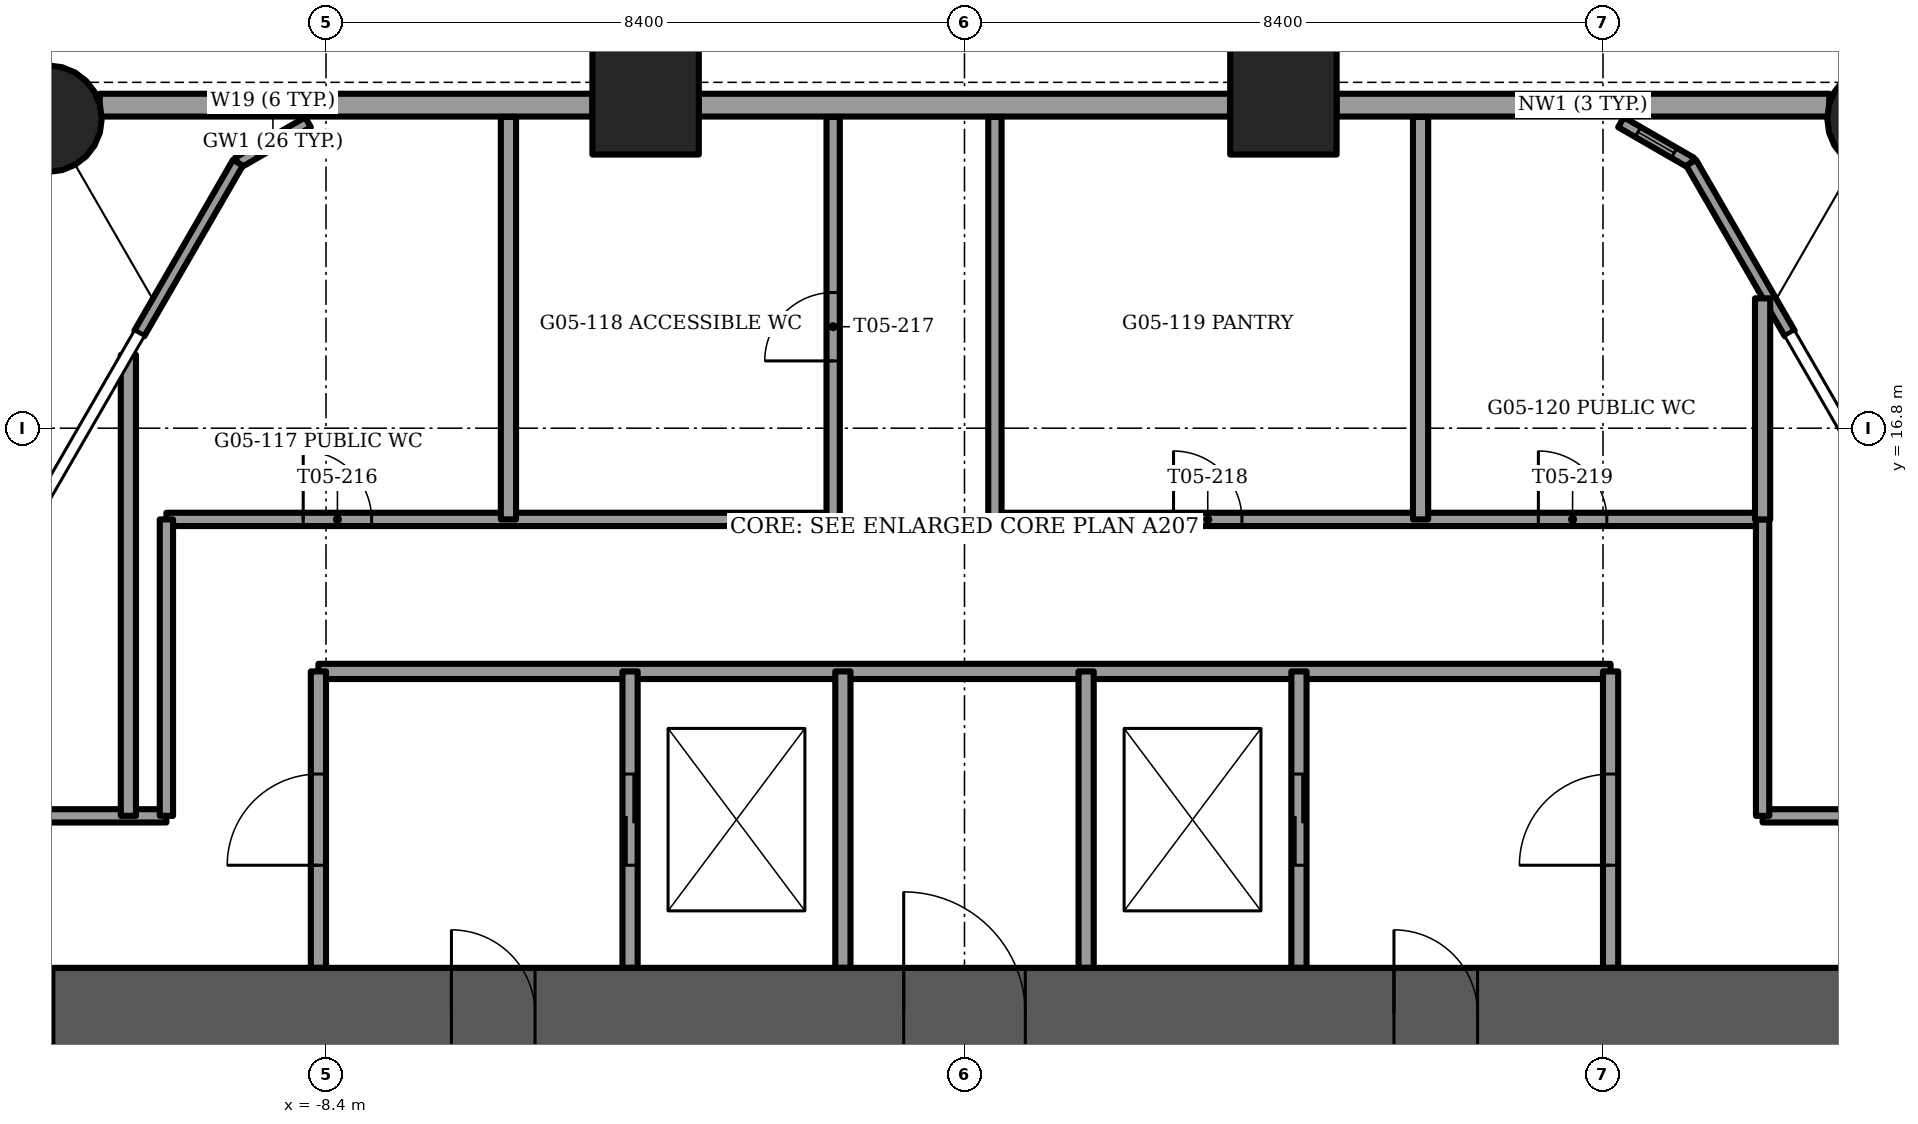
"""IFC4 building model, lengths in metres.
Left out: names, types, materials, properties, quantities, classifications, styles, units other than length and angle.
Written with IfcOpenShell. Run it as: python <this file> out.ifc"""

import sys

from ifc_helpers import new_model, si_unit, direction, frame, frame_2d, origin, origin_2d, place, context, subcontext, project, spatial, rectangle, circle, extrude, element, fill, save


model = new_model("IFC4")
c1 = context("Model", 3, precision=1e-05, world=origin(), true_north=direction((0.0, 1.0)))
c2 = subcontext(c1, "Body", "Model", "MODEL_VIEW")
j1 = project(units=[si_unit("LENGTHUNIT", "METRE"), si_unit("PLANEANGLEUNIT", "RADIAN")], contexts=[c1])
p1 = place(None, origin())
s1 = spatial("IfcSite", under=j1, at=p1, CompositionType="ELEMENT")
p2 = place(p1, origin())
s2 = spatial("IfcBuilding", under=s1, at=p2, CompositionType="ELEMENT")
p3 = place(p2, frame((0.0, 0.0, 23.5)))
s3 = spatial("IfcBuildingStorey", under=s2, at=p3, CompositionType="ELEMENT", Elevation=23.5)
for number, where, z_axis, x_axis in (
    (1, (-12.051, 20.872, -1.2), (0.0, 0.0, 1.0), (1.0, 0.0, 0.0)),
    (2, (12.051, 20.872, -1.2), (0.0, 0.0, 1.0), (1.0, 0.0, 0.0)),
):
    element("IfcColumn", number, at=place(p3, frame(where, z_axis=z_axis, x_axis=x_axis)), inside=s3, PredefinedType="COLUMN", context=c2, shape_type="SweptSolid", body=[
        extrude(circle(Radius=0.7, at=origin_2d()), origin(), (0.0, 0.0, 1.0), 4.5),
    ])
for number, where, z_axis, x_axis in (
    (3, (4.195, 21.1, -1.2), (0.0, 0.0, 1.0), (1.0, 0.0, 0.0)),
    (4, (-4.195, 21.1, -1.2), (0.0, 0.0, 1.0), (1.0, 0.0, 0.0)),
):
    element("IfcColumn", number, at=place(p3, frame(where, z_axis=z_axis, x_axis=x_axis)), inside=s3, PredefinedType="COLUMN", context=c2, shape_type="SweptSolid", body=[
        extrude(rectangle(XDim=1.4, YDim=1.4, at=origin_2d()), origin(), (0.0, 0.0, 1.0), 4.5),
    ])
p4 = place(p3, frame((-12.0, 9.1, -0.3), z_axis=(0.0, 0.0, 1.0), x_axis=(1.0, 0.0, 0.0)))
e5 = element("IfcWall", 5, at=p4, inside=s3, PredefinedType="SHEAR", context=c2, shape_type="SweptSolid", body=[
    extrude(rectangle(XDim=24.0, YDim=1.2, at=frame_2d((12.0, 0.0))), origin(), (0.0, 0.0, 1.0), 4.5),
])
p5 = place(p4, frame((11.2, 0.0, 0.0)))
e6 = element("IfcOpeningElement", 6, at=p5, cuts=e5, PredefinedType="OPENING", context=c2, shape_type="SweptSolid", body=[
    extrude(rectangle(XDim=1.6, YDim=2.1, at=frame_2d((0.8, 1.05))), frame((0.0, 0.6, 0.0), z_axis=(0.0, -1.0, 0.0), x_axis=(1.0, 0.0, 0.0)), (0.0, 0.0, 1.0), 1.2),
])
p6 = place(p4, frame((5.25, 0.0, 0.0)))
e7 = element("IfcOpeningElement", 7, at=p6, cuts=e5, PredefinedType="OPENING", context=c2, shape_type="SweptSolid", body=[
    extrude(rectangle(XDim=1.1, YDim=2.1, at=frame_2d((0.55, 1.05))), frame((0.0, 0.6, 0.0), z_axis=(0.0, -1.0, 0.0), x_axis=(1.0, 0.0, 0.0)), (0.0, 0.0, 1.0), 1.2),
])
p7 = place(p4, frame((17.65, 0.0, 0.0)))
e8 = element("IfcOpeningElement", 8, at=p7, cuts=e5, PredefinedType="OPENING", context=c2, shape_type="SweptSolid", body=[
    extrude(rectangle(XDim=1.1, YDim=2.1, at=frame_2d((0.55, 1.05))), frame((0.0, 0.6, 0.0), z_axis=(0.0, -1.0, 0.0), x_axis=(1.0, 0.0, 0.0)), (0.0, 0.0, 1.0), 1.2),
])
p8 = place(p3, frame((11.377, 21.05, 0.0), z_axis=(0.0, 0.0, 1.0), x_axis=(-1.0, 0.0, 0.0)))
e9 = element("IfcWall", 9, at=p8, inside=s3, PredefinedType="SOLIDWALL", context=c2, shape_type="SweptSolid", body=[
    extrude(rectangle(XDim=6.481, YDim=0.3, at=frame_2d((3.241, 0.0))), origin(), (0.0, 0.0, 1.0), 3.3),
])
p9 = place(p3, frame((3.495, 21.05, 0.0), z_axis=(0.0, 0.0, 1.0), x_axis=(-1.0, 0.0, 0.0)))
e10 = element("IfcWall", 10, at=p9, inside=s3, PredefinedType="SOLIDWALL", context=c2, shape_type="SweptSolid", body=[
    extrude(rectangle(XDim=6.991, YDim=0.3, at=frame_2d((3.495, 0.0))), origin(), (0.0, 0.0, 1.0), 3.3),
])
p10 = place(p3, frame((-4.896, 21.05, 0.0), z_axis=(0.0, 0.0, 1.0), x_axis=(-1.0, 0.0, 0.0)))
e11 = element("IfcWall", 11, at=p10, inside=s3, PredefinedType="SOLIDWALL", context=c2, shape_type="SweptSolid", body=[
    extrude(rectangle(XDim=6.481, YDim=0.3, at=frame_2d((3.241, 0.0))), origin(), (0.0, 0.0, 1.0), 3.3),
])
for number, where, z_axis, x_axis in (
    (12, (-9.56, 20.292, 0.0), (0.0, 0.0, 1.0), (-0.5, -0.866, 0.0)),
    (13, (10.856, 18.046, 0.0), (0.0, 0.0, 1.0), (-0.5, 0.866, 0.0)),
):
    element("IfcWall", number, at=place(p3, frame(where, z_axis=z_axis, x_axis=x_axis)), inside=s3, PredefinedType="SOLIDWALL", context=c2, shape_type="SweptSolid", body=[
        extrude(rectangle(XDim=2.594, YDim=0.15, at=frame_2d((1.297, 0.0))), origin(), (0.0, 0.0, 1.0), 4.2),
    ])
p11 = place(p3, frame((-8.637, 20.825, 0.0), z_axis=(0.0, 0.0, 1.0), x_axis=(-0.866048165231, -0.499960573946, 0.0)))
e14 = element("IfcWall", 14, at=p11, inside=s3, PredefinedType="SOLIDWALL", context=c2, shape_type="SweptSolid", body=[
    extrude(rectangle(XDim=1.065, YDim=0.15, at=frame_2d((0.532, 0.0))), origin(), (0.0, 0.0, 1.0), 4.2),
])
p12 = place(p11, frame((0.258, 0.0, 0.15)))
e15 = element("IfcOpeningElement", 15, at=p12, cuts=e14, PredefinedType="OPENING", context=c2, shape_type="SweptSolid", body=[
    extrude(rectangle(XDim=0.55, YDim=3.6, at=frame_2d((0.275, 1.8))), frame((0.0, 0.075, 0.0), z_axis=(0.0, -1.0, 0.0), x_axis=(1.0, 0.0, 0.0)), (0.0, 0.0, 1.0), 0.15),
])
p13 = place(p3, frame((9.56, 20.292, 0.0), z_axis=(0.0, 0.0, 1.0), x_axis=(-0.866048165231, 0.499960573946, 0.0)))
e16 = element("IfcWall", 16, at=p13, inside=s3, PredefinedType="SOLIDWALL", context=c2, shape_type="SweptSolid", body=[
    extrude(rectangle(XDim=1.065, YDim=0.15, at=frame_2d((0.532, 0.0))), origin(), (0.0, 0.0, 1.0), 4.2),
])
p14 = place(p13, frame((0.258, 0.0, 0.15)))
e17 = element("IfcOpeningElement", 17, at=p14, cuts=e16, PredefinedType="OPENING", context=c2, shape_type="SweptSolid", body=[
    extrude(rectangle(XDim=0.55, YDim=3.6, at=frame_2d((0.275, 1.8))), frame((0.0, 0.075, 0.0), z_axis=(0.0, -1.0, 0.0), x_axis=(1.0, 0.0, 0.0)), (0.0, 0.0, 1.0), 0.15),
])
p15 = place(p3, frame((-8.5, 13.6, 0.0), z_axis=(0.0, 0.0, 1.0), x_axis=(1.0, 0.0, 0.0)))
e18 = element("IfcWall", 18, at=p15, inside=s3, PredefinedType="PARTITIONING", context=c2, shape_type="SweptSolid", body=[
    extrude(rectangle(XDim=17.0, YDim=0.2, at=frame_2d((8.5, 0.0))), origin(), (0.0, 0.0, 1.0), 4.2),
])
p16 = place(p3, frame((-8.5, 9.7, 0.0), z_axis=(0.0, 0.0, 1.0), x_axis=(0.0, 1.0, 0.0)))
e19 = element("IfcWall", 19, at=p16, inside=s3, PredefinedType="PARTITIONING", context=c2, shape_type="SweptSolid", body=[
    extrude(rectangle(XDim=3.9, YDim=0.2, at=frame_2d((1.95, 0.0))), origin(), (0.0, 0.0, 1.0), 4.2),
])
p17 = place(p16, frame((1.35, 0.0, 0.0)))
e20 = element("IfcOpeningElement", 20, at=p17, cuts=e19, PredefinedType="OPENING", context=c2, shape_type="SweptSolid", body=[
    extrude(rectangle(XDim=1.2, YDim=2.1, at=frame_2d((0.6, 1.05))), frame((0.0, 0.1, 0.0), z_axis=(0.0, -1.0, 0.0), x_axis=(1.0, 0.0, 0.0)), (0.0, 0.0, 1.0), 0.2),
])
p18 = place(p3, frame((8.5, 9.7, 0.0), z_axis=(0.0, 0.0, 1.0), x_axis=(0.0, 1.0, 0.0)))
e21 = element("IfcWall", 21, at=p18, inside=s3, PredefinedType="PARTITIONING", context=c2, shape_type="SweptSolid", body=[
    extrude(rectangle(XDim=3.9, YDim=0.2, at=frame_2d((1.95, 0.0))), origin(), (0.0, 0.0, 1.0), 4.2),
])
p19 = place(p18, frame((1.35, 0.0, 0.0)))
e22 = element("IfcOpeningElement", 22, at=p19, cuts=e21, PredefinedType="OPENING", context=c2, shape_type="SweptSolid", body=[
    extrude(rectangle(XDim=1.2, YDim=2.1, at=frame_2d((0.6, 1.05))), frame((0.0, 0.1, 0.0), z_axis=(0.0, -1.0, 0.0), x_axis=(1.0, 0.0, 0.0)), (0.0, 0.0, 1.0), 0.2),
])
p20 = place(p3, frame((-4.4, 9.7, 0.0), z_axis=(0.0, 0.0, 1.0), x_axis=(0.0, 1.0, 0.0)))
e23 = element("IfcWall", 23, at=p20, inside=s3, PredefinedType="PARTITIONING", context=c2, shape_type="SweptSolid", body=[
    extrude(rectangle(XDim=3.9, YDim=0.2, at=frame_2d((1.95, 0.0))), origin(), (0.0, 0.0, 1.0), 4.2),
])
p21 = place(p20, frame((1.35, 0.0, 0.0)))
e24 = element("IfcOpeningElement", 24, at=p21, cuts=e23, PredefinedType="OPENING", context=c2, shape_type="SweptSolid", body=[
    extrude(rectangle(XDim=1.2, YDim=2.1, at=frame_2d((0.6, 1.05))), frame((0.0, 0.1, 0.0), z_axis=(0.0, -1.0, 0.0), x_axis=(1.0, 0.0, 0.0)), (0.0, 0.0, 1.0), 0.2),
])
p22 = place(p3, frame((4.4, 9.7, 0.0), z_axis=(0.0, 0.0, 1.0), x_axis=(0.0, 1.0, 0.0)))
e25 = element("IfcWall", 25, at=p22, inside=s3, PredefinedType="PARTITIONING", context=c2, shape_type="SweptSolid", body=[
    extrude(rectangle(XDim=3.9, YDim=0.2, at=frame_2d((1.95, 0.0))), origin(), (0.0, 0.0, 1.0), 4.2),
])
p23 = place(p22, frame((1.35, 0.0, 0.0)))
e26 = element("IfcOpeningElement", 26, at=p23, cuts=e25, PredefinedType="OPENING", context=c2, shape_type="SweptSolid", body=[
    extrude(rectangle(XDim=1.2, YDim=2.1, at=frame_2d((0.6, 1.05))), frame((0.0, 0.1, 0.0), z_axis=(0.0, -1.0, 0.0), x_axis=(1.0, 0.0, 0.0)), (0.0, 0.0, 1.0), 0.2),
])
for number, where, z_axis, x_axis in (
    (27, (-1.6, 9.7, 0.0), (0.0, 0.0, 1.0), (0.0, 1.0, 0.0)),
    (28, (1.6, 9.7, 0.0), (0.0, 0.0, 1.0), (0.0, 1.0, 0.0)),
):
    element("IfcWall", number, at=place(p3, frame(where, z_axis=z_axis, x_axis=x_axis)), inside=s3, PredefinedType="PARTITIONING", context=c2, shape_type="SweptSolid", body=[
        extrude(rectangle(XDim=3.9, YDim=0.2, at=frame_2d((1.95, 0.0))), origin(), (0.0, 0.0, 1.0), 4.2),
    ])
p24 = place(p3, frame((-14.0, 11.7, 0.0), z_axis=(0.0, 0.0, 1.0), x_axis=(1.0, 0.0, 0.0)))
e29 = element("IfcWall", 29, at=p24, inside=s3, PredefinedType="PARTITIONING", context=c2, shape_type="SweptSolid", body=[
    extrude(rectangle(XDim=3.5, YDim=0.175, at=frame_2d((1.75, 0.0))), origin(), (0.0, 0.0, 1.0), 4.2),
])
p25 = place(p3, frame((10.5, 11.7, 0.0), z_axis=(0.0, 0.0, 1.0), x_axis=(1.0, 0.0, 0.0)))
e30 = element("IfcWall", 30, at=p25, inside=s3, PredefinedType="PARTITIONING", context=c2, shape_type="SweptSolid", body=[
    extrude(rectangle(XDim=3.999, YDim=0.175, at=frame_2d((2.0, 0.0))), origin(), (0.0, 0.0, 1.0), 4.2),
])
p26 = place(p3, frame((-10.5, 15.6, 0.0), z_axis=(0.0, 0.0, 1.0), x_axis=(1.0, 0.0, 0.0)))
e31 = element("IfcWall", 31, at=p26, inside=s3, PredefinedType="PARTITIONING", context=c2, shape_type="SweptSolid", body=[
    extrude(rectangle(XDim=8.772, YDim=0.175, at=frame_2d((4.386, 0.0))), origin(), (0.0, 0.0, 1.0), 4.2),
])
p27 = place(p26, frame((1.8, 0.0, 0.0)))
e32 = element("IfcOpeningElement", 32, at=p27, cuts=e31, PredefinedType="OPENING", context=c2, shape_type="SweptSolid", body=[
    extrude(rectangle(XDim=0.9, YDim=2.1, at=frame_2d((0.45, 1.05))), frame((0.0, 0.087, 0.0), z_axis=(0.0, -1.0, 0.0), x_axis=(1.0, 0.0, 0.0)), (0.0, 0.0, 1.0), 0.175),
])
p28 = place(p3, frame((0.4, 15.6, 0.0), z_axis=(0.0, 0.0, 1.0), x_axis=(1.0, 0.0, 0.0)))
e33 = element("IfcWall", 33, at=p28, inside=s3, PredefinedType="PARTITIONING", context=c2, shape_type="SweptSolid", body=[
    extrude(rectangle(XDim=10.1, YDim=0.175, at=frame_2d((5.05, 0.0))), origin(), (0.0, 0.0, 1.0), 4.2),
])
p29 = place(p28, frame((2.35, 0.0, 0.0)))
e34 = element("IfcOpeningElement", 34, at=p29, cuts=e33, PredefinedType="OPENING", context=c2, shape_type="SweptSolid", body=[
    extrude(rectangle(XDim=0.9, YDim=2.1, at=frame_2d((0.45, 1.05))), frame((0.0, 0.087, 0.0), z_axis=(0.0, -1.0, 0.0), x_axis=(1.0, 0.0, 0.0)), (0.0, 0.0, 1.0), 0.175),
])
p30 = place(p28, frame((7.15, 0.0, 0.0)))
e35 = element("IfcOpeningElement", 35, at=p30, cuts=e33, PredefinedType="OPENING", context=c2, shape_type="SweptSolid", body=[
    extrude(rectangle(XDim=0.9, YDim=2.1, at=frame_2d((0.45, 1.05))), frame((0.0, 0.087, 0.0), z_axis=(0.0, -1.0, 0.0), x_axis=(1.0, 0.0, 0.0)), (0.0, 0.0, 1.0), 0.175),
])
p31 = place(p3, frame((-10.5, 11.7, 0.0), z_axis=(0.0, 0.0, 1.0), x_axis=(0.0, 1.0, 0.0)))
e36 = element("IfcWall", 36, at=p31, inside=s3, PredefinedType="PARTITIONING", context=c2, shape_type="SweptSolid", body=[
    extrude(rectangle(XDim=3.9, YDim=0.175, at=frame_2d((1.95, 0.0))), origin(), (0.0, 0.0, 1.0), 4.2),
])
p32 = place(p3, frame((-1.728, 15.6, 0.0), z_axis=(0.0, 0.0, 1.0), x_axis=(0.0, 1.0, 0.0)))
e37 = element("IfcWall", 37, at=p32, inside=s3, PredefinedType="PARTITIONING", context=c2, shape_type="SweptSolid", body=[
    extrude(rectangle(XDim=5.295, YDim=0.175, at=frame_2d((2.647, 0.0))), origin(), (0.0, 0.0, 1.0), 4.2),
])
p33 = place(p32, frame((2.085, 0.0, 0.0)))
e38 = element("IfcOpeningElement", 38, at=p33, cuts=e37, PredefinedType="OPENING", context=c2, shape_type="SweptSolid", body=[
    extrude(rectangle(XDim=0.9, YDim=2.1, at=frame_2d((0.45, 1.05))), frame((0.0, 0.087, 0.0), z_axis=(0.0, -1.0, 0.0), x_axis=(1.0, 0.0, 0.0)), (0.0, 0.0, 1.0), 0.175),
])
p34 = place(p3, frame((0.4, 15.6, 0.0), z_axis=(0.0, 0.0, 1.0), x_axis=(0.0, 1.0, 0.0)))
e39 = element("IfcWall", 39, at=p34, inside=s3, PredefinedType="PARTITIONING", context=c2, shape_type="SweptSolid", body=[
    extrude(rectangle(XDim=5.295, YDim=0.175, at=frame_2d((2.647, 0.0))), origin(), (0.0, 0.0, 1.0), 4.2),
])
p35 = place(p3, frame((10.5, 11.7, 0.0), z_axis=(0.0, 0.0, 1.0), x_axis=(0.0, 1.0, 0.0)))
e40 = element("IfcWall", 40, at=p35, inside=s3, PredefinedType="PARTITIONING", context=c2, shape_type="SweptSolid", body=[
    extrude(rectangle(XDim=3.9, YDim=0.175, at=frame_2d((1.95, 0.0))), origin(), (0.0, 0.0, 1.0), 4.2),
])
p36 = place(p3, frame((-11.0, 11.7, 0.0), z_axis=(0.0, 0.0, 1.0), x_axis=(0.0, 1.0, 0.0)))
e41 = element("IfcWall", 41, at=p36, inside=s3, PredefinedType="PARTITIONING", context=c2, shape_type="SweptSolid", body=[
    extrude(rectangle(XDim=6.064, YDim=0.2, at=frame_2d((3.032, 0.0))), origin(), (0.0, 0.0, 1.0), 4.2),
])
for number, where, z_axis, x_axis in (
    (42, (-6.0, 15.6, 0.0), (0.0, 0.0, 1.0), (0.0, 1.0, 0.0)),
    (43, (6.0, 15.6, 0.0), (0.0, 0.0, 1.0), (0.0, 1.0, 0.0)),
):
    element("IfcWall", number, at=place(p3, frame(where, z_axis=z_axis, x_axis=x_axis)), inside=s3, PredefinedType="PARTITIONING", context=c2, shape_type="SweptSolid", body=[
        extrude(rectangle(XDim=5.295, YDim=0.2, at=frame_2d((2.647, 0.0))), origin(), (0.0, 0.0, 1.0), 4.2),
    ])
p37 = place(p3, frame((10.5, 15.6, 0.0), z_axis=(0.0, 0.0, 1.0), x_axis=(0.0, 1.0, 0.0)))
e44 = element("IfcWall", 44, at=p37, inside=s3, PredefinedType="PARTITIONING", context=c2, shape_type="SweptSolid", body=[
    extrude(rectangle(XDim=2.908, YDim=0.2, at=frame_2d((1.454, 0.0))), origin(), (0.0, 0.0, 1.0), 4.2),
])
p38 = place(p12, origin())
e45 = element("IfcWindow", 45, at=p38, inside=s3, PartitioningType="SINGLE_PANEL", PredefinedType="WINDOW", context=c2, shape_type="SweptSolid", body=[
    extrude(rectangle(XDim=0.55, YDim=3.6, at=frame_2d((0.275, 1.8))), frame((0.0, 0.03, 0.0), z_axis=(0.0, -1.0, 0.0), x_axis=(1.0, 0.0, 0.0)), (0.0, 0.0, 1.0), 0.06),
])
fill(e15, e45)
p39 = place(p14, origin())
e46 = element("IfcWindow", 46, at=p39, inside=s3, PartitioningType="SINGLE_PANEL", PredefinedType="WINDOW", context=c2, shape_type="SweptSolid", body=[
    extrude(rectangle(XDim=0.55, YDim=3.6, at=frame_2d((0.275, 1.8))), frame((0.0, 0.03, 0.0), z_axis=(0.0, -1.0, 0.0), x_axis=(1.0, 0.0, 0.0)), (0.0, 0.0, 1.0), 0.06),
])
fill(e17, e46)
p40 = place(p5, origin())
e47 = element("IfcDoor", 47, at=p40, inside=s3, OperationType="DOUBLE_DOOR_SINGLE_SWING", PredefinedType="DOOR", context=c2, shape_type="SweptSolid", body=[
    extrude(rectangle(XDim=1.6, YDim=2.1, at=frame_2d((0.8, 1.05))), frame((0.0, 0.025, 0.0), z_axis=(0.0, -1.0, 0.0), x_axis=(1.0, 0.0, 0.0)), (0.0, 0.0, 1.0), 0.05),
])
fill(e6, e47)
p41 = place(p6, origin())
e48 = element("IfcDoor", 48, at=p41, inside=s3, OperationType="SINGLE_SWING_LEFT", PredefinedType="DOOR", context=c2, shape_type="SweptSolid", body=[
    extrude(rectangle(XDim=1.1, YDim=2.1, at=frame_2d((0.55, 1.05))), frame((0.0, 0.025, 0.0), z_axis=(0.0, -1.0, 0.0), x_axis=(1.0, 0.0, 0.0)), (0.0, 0.0, 1.0), 0.05),
])
fill(e7, e48)
p42 = place(p7, origin())
e49 = element("IfcDoor", 49, at=p42, inside=s3, OperationType="SINGLE_SWING_RIGHT", PredefinedType="DOOR", context=c2, shape_type="SweptSolid", body=[
    extrude(rectangle(XDim=1.1, YDim=2.1, at=frame_2d((0.55, 1.05))), frame((0.0, 0.025, 0.0), z_axis=(0.0, -1.0, 0.0), x_axis=(1.0, 0.0, 0.0)), (0.0, 0.0, 1.0), 0.05),
])
fill(e8, e49)
p43 = place(p21, origin())
e50 = element("IfcDoor", 50, at=p43, inside=s3, OperationType="SLIDING_TO_LEFT", PredefinedType="DOOR", context=c2, shape_type="SweptSolid", body=[
    extrude(rectangle(XDim=1.2, YDim=2.1, at=frame_2d((0.6, 1.05))), frame((0.0, 0.025, 0.0), z_axis=(0.0, -1.0, 0.0), x_axis=(1.0, 0.0, 0.0)), (0.0, 0.0, 1.0), 0.05),
])
fill(e24, e50)
p44 = place(p17, origin())
e51 = element("IfcDoor", 51, at=p44, inside=s3, OperationType="SINGLE_SWING_LEFT", PredefinedType="DOOR", context=c2, shape_type="SweptSolid", body=[
    extrude(rectangle(XDim=1.2, YDim=2.1, at=frame_2d((0.6, 1.05))), frame((0.0, 0.025, 0.0), z_axis=(0.0, -1.0, 0.0), x_axis=(1.0, 0.0, 0.0)), (0.0, 0.0, 1.0), 0.05),
])
fill(e20, e51)
p45 = place(p23, origin())
e52 = element("IfcDoor", 52, at=p45, inside=s3, OperationType="SLIDING_TO_LEFT", PredefinedType="DOOR", context=c2, shape_type="SweptSolid", body=[
    extrude(rectangle(XDim=1.2, YDim=2.1, at=frame_2d((0.6, 1.05))), frame((0.0, 0.025, 0.0), z_axis=(0.0, -1.0, 0.0), x_axis=(1.0, 0.0, 0.0)), (0.0, 0.0, 1.0), 0.05),
])
fill(e26, e52)
p46 = place(p19, origin())
e53 = element("IfcDoor", 53, at=p46, inside=s3, OperationType="SINGLE_SWING_LEFT", PredefinedType="DOOR", context=c2, shape_type="SweptSolid", body=[
    extrude(rectangle(XDim=1.2, YDim=2.1, at=frame_2d((0.6, 1.05))), frame((0.0, 0.025, 0.0), z_axis=(0.0, -1.0, 0.0), x_axis=(1.0, 0.0, 0.0)), (0.0, 0.0, 1.0), 0.05),
])
fill(e22, e53)
p47 = place(p27, origin())
e54 = element("IfcDoor", 54, at=p47, inside=s3, OperationType="SINGLE_SWING_RIGHT", PredefinedType="DOOR", context=c2, shape_type="SweptSolid", body=[
    extrude(rectangle(XDim=0.9, YDim=2.1, at=frame_2d((0.45, 1.05))), frame((0.0, 0.025, 0.0), z_axis=(0.0, -1.0, 0.0), x_axis=(1.0, 0.0, 0.0)), (0.0, 0.0, 1.0), 0.05),
])
fill(e32, e54)
p48 = place(p33, origin())
e55 = element("IfcDoor", 55, at=p48, inside=s3, OperationType="SINGLE_SWING_LEFT", PredefinedType="DOOR", context=c2, shape_type="SweptSolid", body=[
    extrude(rectangle(XDim=0.9, YDim=2.1, at=frame_2d((0.45, 1.05))), frame((0.0, 0.025, 0.0), z_axis=(0.0, -1.0, 0.0), x_axis=(1.0, 0.0, 0.0)), (0.0, 0.0, 1.0), 0.05),
])
fill(e38, e55)
p49 = place(p29, origin())
e56 = element("IfcDoor", 56, at=p49, inside=s3, OperationType="SINGLE_SWING_RIGHT", PredefinedType="DOOR", context=c2, shape_type="SweptSolid", body=[
    extrude(rectangle(XDim=0.9, YDim=2.1, at=frame_2d((0.45, 1.05))), frame((0.0, 0.025, 0.0), z_axis=(0.0, -1.0, 0.0), x_axis=(1.0, 0.0, 0.0)), (0.0, 0.0, 1.0), 0.05),
])
fill(e34, e56)
p50 = place(p30, origin())
e57 = element("IfcDoor", 57, at=p50, inside=s3, OperationType="SINGLE_SWING_LEFT", PredefinedType="DOOR", context=c2, shape_type="SweptSolid", body=[
    extrude(rectangle(XDim=0.9, YDim=2.1, at=frame_2d((0.45, 1.05))), frame((0.0, 0.025, 0.0), z_axis=(0.0, -1.0, 0.0), x_axis=(1.0, 0.0, 0.0)), (0.0, 0.0, 1.0), 0.05),
])
fill(e35, e57)
save(model, sys.argv[1])
